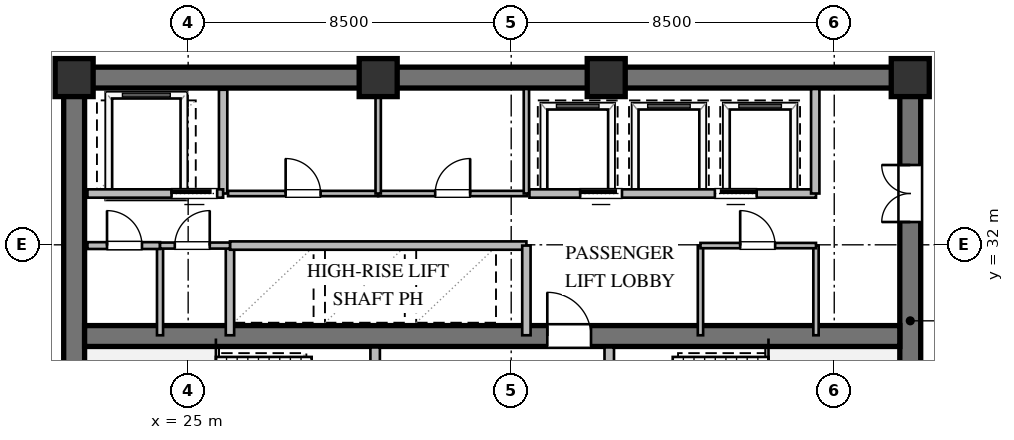
"""IFC4 building model, lengths in metres.
Left out: names, types, materials, properties, quantities, classifications, styles, units other than length and angle.
Written with IfcOpenShell. Run it as: python <this file> out.ifc"""

import sys

from ifc_helpers import new_model, si_unit, direction, frame, frame_2d, origin, origin_2d, place, context, subcontext, project, spatial, rectangle, extrude, element, fill, save


model = new_model("IFC4")
c1 = context("Model", 3, precision=1e-05, world=origin(), true_north=direction((0.0, 1.0)))
c2 = subcontext(c1, "Body", "Model", "MODEL_VIEW")
j1 = project(units=[si_unit("LENGTHUNIT", "METRE"), si_unit("PLANEANGLEUNIT", "RADIAN")], contexts=[c1])
p1 = place(None, origin())
s1 = spatial("IfcSite", under=j1, at=p1, CompositionType="ELEMENT")
p2 = place(p1, origin())
s2 = spatial("IfcBuilding", under=s1, at=p2, CompositionType="ELEMENT")
p3 = place(p2, frame((0.0, 0.0, 171.0)))
s3 = spatial("IfcBuildingStorey", under=s2, at=p3, CompositionType="ELEMENT", Elevation=171.0)
p4 = place(p3, frame((21.725, 36.4, 0.0), z_axis=(0.0, 0.0, 1.0), x_axis=(1.0, 0.0, 0.0)))
e1 = element("IfcWall", 1, at=p4, inside=s3, PredefinedType="SHEAR", context=c2, shape_type="SweptSolid", body=[
    extrude(rectangle(XDim=22.55, YDim=0.55, at=frame_2d((11.275, 0.0))), origin(), (0.0, 0.0, 1.0), 3.36),
])
p5 = place(p3, frame((22.0, 23.875, 0.0), z_axis=(0.0, 0.0, 1.0), x_axis=(0.0, 1.0, 0.0)))
e2 = element("IfcWall", 2, at=p5, inside=s3, PredefinedType="SHEAR", context=c2, shape_type="SweptSolid", body=[
    extrude(rectangle(XDim=12.25, YDim=0.55, at=frame_2d((6.125, 0.0))), origin(), (0.0, 0.0, 1.0), 3.36),
])
p6 = place(p3, frame((44.0, 23.875, 0.0), z_axis=(0.0, 0.0, 1.0), x_axis=(0.0, 1.0, 0.0)))
e3 = element("IfcWall", 3, at=p6, inside=s3, PredefinedType="SHEAR", context=c2, shape_type="SweptSolid", body=[
    extrude(rectangle(XDim=12.25, YDim=0.55, at=frame_2d((6.125, 0.0))), origin(), (0.0, 0.0, 1.0), 3.36),
])
p7 = place(p6, frame((8.725, 0.0, 0.0)))
e4 = element("IfcOpeningElement", 4, at=p7, cuts=e3, PredefinedType="OPENING", context=c2, shape_type="SweptSolid", body=[
    extrude(rectangle(XDim=1.5, YDim=2.15, at=frame_2d((0.75, 1.075))), frame((0.0, 0.285, 0.0), z_axis=(0.0, -1.0, 0.0), x_axis=(1.0, 0.0, 0.0)), (0.0, 0.0, 1.0), 0.57),
])
p8 = place(p3, frame((22.275, 29.6, 0.0), z_axis=(0.0, 0.0, 1.0), x_axis=(1.0, 0.0, 0.0)))
e5 = element("IfcWall", 5, at=p8, inside=s3, PredefinedType="SHEAR", context=c2, shape_type="SweptSolid", body=[
    extrude(rectangle(XDim=21.45, YDim=0.55, at=frame_2d((10.725, 0.0))), origin(), (0.0, 0.0, 1.0), 3.36),
])
p9 = place(p8, frame((12.175, 0.0, 0.0)))
e6 = element("IfcOpeningElement", 6, at=p9, cuts=e5, PredefinedType="OPENING", context=c2, shape_type="SweptSolid", body=[
    extrude(rectangle(XDim=1.15, YDim=2.1, at=frame_2d((0.575, 1.05))), frame((0.0, 0.285, 0.0), z_axis=(0.0, -1.0, 0.0), x_axis=(1.0, 0.0, 0.0)), (0.0, 0.0, 1.0), 0.57),
])
for number, where, z_axis, x_axis in (
    (7, (44.0, 36.4, 0.0), (0.0, 0.0, 1.0), (1.0, 0.0, 0.0)),
    (8, (36.0, 36.4, 0.0), (0.0, 0.0, 1.0), (1.0, 0.0, 0.0)),
    (9, (30.0, 36.4, 0.0), (0.0, 0.0, 1.0), (1.0, 0.0, 0.0)),
    (10, (22.0, 36.4, 0.0), (0.0, 0.0, 1.0), (1.0, 0.0, 0.0)),
):
    element("IfcColumn", number, at=place(p3, frame(where, z_axis=z_axis, x_axis=x_axis)), inside=s3, PredefinedType="COLUMN", context=c2, shape_type="SweptSolid", body=[
        extrude(rectangle(XDim=1.0, YDim=1.0, at=origin_2d()), origin(), (0.0, 0.0, 1.0), 3.6),
    ])
p10 = place(p3, frame((29.92, 23.9, 0.0), z_axis=(0.0, 0.0, 1.0), x_axis=(0.0, 1.0, 0.0)))
e11 = element("IfcWall", 11, at=p10, inside=s3, PredefinedType="SOLIDWALL", context=c2, shape_type="SweptSolid", body=[
    extrude(rectangle(XDim=5.4, YDim=0.25, at=frame_2d((2.7, 0.0))), origin(), (0.0, 0.0, 1.0), 2.89),
])
p11 = place(p10, frame((3.421, 0.0, 0.0)))
e12 = element("IfcOpeningElement", 12, at=p11, cuts=e11, PredefinedType="OPENING", context=c2, shape_type="SweptSolid", body=[
    extrude(rectangle(XDim=1.15, YDim=2.1, at=frame_2d((0.575, 1.05))), frame((0.0, 0.135, 0.0), z_axis=(0.0, -1.0, 0.0), x_axis=(1.0, 0.0, 0.0)), (0.0, 0.0, 1.0), 0.27),
])
p12 = place(p3, frame((36.08, 23.9, 0.0), z_axis=(0.0, 0.0, 1.0), x_axis=(0.0, 1.0, 0.0)))
e13 = element("IfcWall", 13, at=p12, inside=s3, PredefinedType="SOLIDWALL", context=c2, shape_type="SweptSolid", body=[
    extrude(rectangle(XDim=5.4, YDim=0.25, at=frame_2d((2.7, 0.0))), origin(), (0.0, 0.0, 1.0), 3.36),
])
p13 = place(p12, frame((3.421, 0.0, 0.0)))
e14 = element("IfcOpeningElement", 14, at=p13, cuts=e13, PredefinedType="OPENING", context=c2, shape_type="SweptSolid", body=[
    extrude(rectangle(XDim=1.15, YDim=2.1, at=frame_2d((0.575, 1.05))), frame((0.0, 0.135, 0.0), z_axis=(0.0, -1.0, 0.0), x_axis=(1.0, 0.0, 0.0)), (0.0, 0.0, 1.0), 0.27),
])
p14 = place(p3, frame((25.92, 33.35, 0.0), z_axis=(0.0, 0.0, 1.0), x_axis=(0.0, 1.0, 0.0)))
e15 = element("IfcWall", 15, at=p14, inside=s3, PredefinedType="SOLIDWALL", context=c2, shape_type="SweptSolid", body=[
    extrude(rectangle(XDim=2.73, YDim=0.22, at=frame_2d((1.365, 0.0))), origin(), (0.0, 0.0, 1.0), 3.36),
])
p15 = place(p3, frame((22.35, 33.35, 0.0), z_axis=(0.0, 0.0, 1.0), x_axis=(1.0, 0.0, 0.0)))
e16 = element("IfcWall", 16, at=p15, inside=s3, PredefinedType="SOLIDWALL", context=c2, shape_type="SweptSolid", body=[
    extrude(rectangle(XDim=3.57, YDim=0.22, at=frame_2d((1.785, 0.0))), origin(), (0.0, 0.0, 1.0), 3.36),
])
p16 = place(p15, frame((2.213, 0.0, 0.0)))
e17 = element("IfcOpeningElement", 17, at=p16, cuts=e16, PredefinedType="OPENING", context=c2, shape_type="SweptSolid", body=[
    extrude(rectangle(XDim=1.2, YDim=2.1, at=frame_2d((0.6, 1.05))), frame((0.0, 0.12, 0.0), z_axis=(0.0, -1.0, 0.0), x_axis=(1.0, 0.0, 0.0)), (0.0, 0.0, 1.0), 0.24),
])
p17 = place(p3, frame((26.1, 29.62, 0.0), z_axis=(0.0, 0.0, 1.0), x_axis=(0.0, 1.0, 0.0)))
e18 = element("IfcWall", 18, at=p17, inside=s3, PredefinedType="SOLIDWALL", context=c2, shape_type="SweptSolid", body=[
    extrude(rectangle(XDim=2.36, YDim=0.22, at=frame_2d((1.18, 0.0))), origin(), (0.0, 0.0, 1.0), 3.36),
])
p18 = place(p3, frame((26.1, 31.98, 0.0), z_axis=(0.0, 0.0, 1.0), x_axis=(1.0, 0.0, 0.0)))
e19 = element("IfcWall", 19, at=p18, inside=s3, PredefinedType="SOLIDWALL", context=c2, shape_type="SweptSolid", body=[
    extrude(rectangle(XDim=7.8, YDim=0.22, at=frame_2d((3.9, 0.0))), origin(), (0.0, 0.0, 1.0), 3.36),
])
p19 = place(p3, frame((33.9, 29.62, 0.0), z_axis=(0.0, 0.0, 1.0), x_axis=(0.0, 1.0, 0.0)))
e20 = element("IfcWall", 20, at=p19, inside=s3, PredefinedType="SOLIDWALL", context=c2, shape_type="SweptSolid", body=[
    extrude(rectangle(XDim=2.36, YDim=0.22, at=frame_2d((1.18, 0.0))), origin(), (0.0, 0.0, 1.0), 3.36),
])
p20 = place(p3, frame((26.05, 33.35, 0.0), z_axis=(0.0, 0.0, 1.0), x_axis=(1.0, 0.0, 0.0)))
e21 = element("IfcWall", 21, at=p20, inside=s3, PredefinedType="PARTITIONING", context=c2, shape_type="SweptSolid", body=[
    extrude(rectangle(XDim=3.95, YDim=0.14, at=frame_2d((1.975, 0.0))), origin(), (0.0, 0.0, 1.0), 3.36),
])
p21 = place(p20, frame((1.515, 0.0, 0.0)))
e22 = element("IfcOpeningElement", 22, at=p21, cuts=e21, PredefinedType="OPENING", context=c2, shape_type="SweptSolid", body=[
    extrude(rectangle(XDim=0.92, YDim=2.1, at=frame_2d((0.46, 1.05))), frame((0.0, 0.08, 0.0), z_axis=(0.0, -1.0, 0.0), x_axis=(1.0, 0.0, 0.0)), (0.0, 0.0, 1.0), 0.16),
])
p22 = place(p3, frame((30.0, 33.35, 0.0), z_axis=(0.0, 0.0, 1.0), x_axis=(1.0, 0.0, 0.0)))
e23 = element("IfcWall", 23, at=p22, inside=s3, PredefinedType="PARTITIONING", context=c2, shape_type="SweptSolid", body=[
    extrude(rectangle(XDim=3.92, YDim=0.14, at=frame_2d((1.96, 0.0))), origin(), (0.0, 0.0, 1.0), 3.36),
])
p23 = place(p22, frame((1.5, 0.0, 0.0)))
e24 = element("IfcOpeningElement", 24, at=p23, cuts=e23, PredefinedType="OPENING", context=c2, shape_type="SweptSolid", body=[
    extrude(rectangle(XDim=0.92, YDim=2.1, at=frame_2d((0.46, 1.05))), frame((0.0, 0.08, 0.0), z_axis=(0.0, -1.0, 0.0), x_axis=(1.0, 0.0, 0.0)), (0.0, 0.0, 1.0), 0.16),
])
for number, where, z_axis, x_axis in (
    (25, (30.0, 33.35, 0.0), (0.0, 0.0, 1.0), (0.0, 1.0, 0.0)),
    (26, (33.9, 33.35, 0.0), (0.0, 0.0, 1.0), (0.0, 1.0, 0.0)),
):
    element("IfcWall", number, at=place(p3, frame(where, z_axis=z_axis, x_axis=x_axis)), inside=s3, PredefinedType="PARTITIONING", context=c2, shape_type="SweptSolid", body=[
        extrude(rectangle(XDim=2.75, YDim=0.14, at=frame_2d((1.375, 0.0))), origin(), (0.0, 0.0, 1.0), 3.36),
    ])
p24 = place(p3, frame((33.98, 33.35, 0.0), z_axis=(0.0, 0.0, 1.0), x_axis=(1.0, 0.0, 0.0)))
e27 = element("IfcWall", 27, at=p24, inside=s3, PredefinedType="SOLIDWALL", context=c2, shape_type="SweptSolid", body=[
    extrude(rectangle(XDim=7.54, YDim=0.22, at=frame_2d((3.77, 0.0))), origin(), (0.0, 0.0, 1.0), 3.36),
])
p25 = place(p24, frame((1.335, 0.0, 0.0)))
e28 = element("IfcOpeningElement", 28, at=p25, cuts=e27, PredefinedType="OPENING", context=c2, shape_type="SweptSolid", body=[
    extrude(rectangle(XDim=1.1, YDim=2.1, at=frame_2d((0.55, 1.05))), frame((0.0, 0.12, 0.0), z_axis=(0.0, -1.0, 0.0), x_axis=(1.0, 0.0, 0.0)), (0.0, 0.0, 1.0), 0.24),
])
p26 = place(p24, frame((4.879, 0.0, 0.0)))
e29 = element("IfcOpeningElement", 29, at=p26, cuts=e27, PredefinedType="OPENING", context=c2, shape_type="SweptSolid", body=[
    extrude(rectangle(XDim=1.1, YDim=2.1, at=frame_2d((0.55, 1.05))), frame((0.0, 0.12, 0.0), z_axis=(0.0, -1.0, 0.0), x_axis=(1.0, 0.0, 0.0)), (0.0, 0.0, 1.0), 0.24),
])
p27 = place(p3, frame((41.5, 33.35, 0.0), z_axis=(0.0, 0.0, 1.0), x_axis=(0.0, 1.0, 0.0)))
e30 = element("IfcWall", 30, at=p27, inside=s3, PredefinedType="SOLIDWALL", context=c2, shape_type="SweptSolid", body=[
    extrude(rectangle(XDim=2.75, YDim=0.22, at=frame_2d((1.375, 0.0))), origin(), (0.0, 0.0, 1.0), 3.36),
])
p28 = place(p3, frame((24.26, 29.62, 0.0), z_axis=(0.0, 0.0, 1.0), x_axis=(0.0, 1.0, 0.0)))
e31 = element("IfcWall", 31, at=p28, inside=s3, PredefinedType="PLUMBINGWALL", context=c2, shape_type="SweptSolid", body=[
    extrude(rectangle(XDim=2.36, YDim=0.16, at=frame_2d((1.18, 0.0))), origin(), (0.0, 0.0, 1.0), 3.36),
])
p29 = place(p3, frame((22.35, 31.98, 0.0), z_axis=(0.0, 0.0, 1.0), x_axis=(1.0, 0.0, 0.0)))
e32 = element("IfcWall", 32, at=p29, inside=s3, PredefinedType="PARTITIONING", context=c2, shape_type="SweptSolid", body=[
    extrude(rectangle(XDim=1.91, YDim=0.18, at=frame_2d((0.955, 0.0))), origin(), (0.0, 0.0, 1.0), 3.36),
])
p30 = place(p29, frame((0.515, 0.0, 0.0)))
e33 = element("IfcOpeningElement", 33, at=p30, cuts=e32, PredefinedType="OPENING", context=c2, shape_type="SweptSolid", body=[
    extrude(rectangle(XDim=0.92, YDim=2.1, at=frame_2d((0.46, 1.05))), frame((0.0, 0.1, 0.0), z_axis=(0.0, -1.0, 0.0), x_axis=(1.0, 0.0, 0.0)), (0.0, 0.0, 1.0), 0.2),
])
p31 = place(p3, frame((24.26, 31.98, 0.0), z_axis=(0.0, 0.0, 1.0), x_axis=(1.0, 0.0, 0.0)))
e34 = element("IfcWall", 34, at=p31, inside=s3, PredefinedType="PLUMBINGWALL", context=c2, shape_type="SweptSolid", body=[
    extrude(rectangle(XDim=1.84, YDim=0.16, at=frame_2d((0.92, 0.0))), origin(), (0.0, 0.0, 1.0), 3.36),
])
p32 = place(p31, frame((0.388, 0.0, 0.0)))
e35 = element("IfcOpeningElement", 35, at=p32, cuts=e34, PredefinedType="OPENING", context=c2, shape_type="SweptSolid", body=[
    extrude(rectangle(XDim=0.92, YDim=2.1, at=frame_2d((0.46, 1.05))), frame((0.0, 0.09, 0.0), z_axis=(0.0, -1.0, 0.0), x_axis=(1.0, 0.0, 0.0)), (0.0, 0.0, 1.0), 0.18),
])
for number, where, z_axis, x_axis in (
    (36, (38.48, 29.62, 0.0), (0.0, 0.0, 1.0), (0.0, 1.0, 0.0)),
    (37, (41.52, 29.62, 0.0), (0.0, 0.0, 1.0), (0.0, 1.0, 0.0)),
):
    element("IfcWall", number, at=place(p3, frame(where, z_axis=z_axis, x_axis=x_axis)), inside=s3, PredefinedType="PARTITIONING", context=c2, shape_type="SweptSolid", body=[
        extrude(rectangle(XDim=2.36, YDim=0.14, at=frame_2d((1.18, 0.0))), origin(), (0.0, 0.0, 1.0), 3.36),
    ])
p33 = place(p3, frame((38.48, 31.98, 0.0), z_axis=(0.0, 0.0, 1.0), x_axis=(1.0, 0.0, 0.0)))
e38 = element("IfcWall", 38, at=p33, inside=s3, PredefinedType="PARTITIONING", context=c2, shape_type="SweptSolid", body=[
    extrude(rectangle(XDim=3.04, YDim=0.14, at=frame_2d((1.52, 0.0))), origin(), (0.0, 0.0, 1.0), 3.36),
])
p34 = place(p33, frame((1.045, 0.0, 0.0)))
e39 = element("IfcOpeningElement", 39, at=p34, cuts=e38, PredefinedType="OPENING", context=c2, shape_type="SweptSolid", body=[
    extrude(rectangle(XDim=0.92, YDim=2.1, at=frame_2d((0.46, 1.05))), frame((0.0, 0.08, 0.0), z_axis=(0.0, -1.0, 0.0), x_axis=(1.0, 0.0, 0.0)), (0.0, 0.0, 1.0), 0.16),
])
p35 = place(p9, origin())
e40 = element("IfcDoor", 40, at=p35, inside=s3, OperationType="SINGLE_SWING_LEFT", PredefinedType="DOOR", context=c2, shape_type="SweptSolid", body=[
    extrude(rectangle(XDim=1.15, YDim=2.1, at=frame_2d((0.575, 1.05))), frame((0.0, 0.025, 0.0), z_axis=(0.0, -1.0, 0.0), x_axis=(1.0, 0.0, 0.0)), (0.0, 0.0, 1.0), 0.05),
])
fill(e6, e40)
p36 = place(p7, origin())
e41 = element("IfcDoor", 41, at=p36, inside=s3, OperationType="DOUBLE_DOOR_SINGLE_SWING", PredefinedType="DOOR", context=c2, shape_type="SweptSolid", body=[
    extrude(rectangle(XDim=1.5, YDim=2.15, at=frame_2d((0.75, 1.075))), frame((0.0, 0.025, 0.0), z_axis=(0.0, -1.0, 0.0), x_axis=(1.0, 0.0, 0.0)), (0.0, 0.0, 1.0), 0.05),
])
fill(e4, e41)
p37 = place(p16, origin())
e42 = element("IfcDoor", 42, at=p37, inside=s3, OperationType="SLIDING_TO_LEFT", PredefinedType="DOOR", context=c2, shape_type="SweptSolid", body=[
    extrude(rectangle(XDim=1.2, YDim=2.1, at=frame_2d((0.6, 1.05))), frame((0.0, 0.025, 0.0), z_axis=(0.0, -1.0, 0.0), x_axis=(1.0, 0.0, 0.0)), (0.0, 0.0, 1.0), 0.05),
])
fill(e17, e42)
p38 = place(p21, origin())
e43 = element("IfcDoor", 43, at=p38, inside=s3, OperationType="SINGLE_SWING_LEFT", PredefinedType="DOOR", context=c2, shape_type="SweptSolid", body=[
    extrude(rectangle(XDim=0.92, YDim=2.1, at=frame_2d((0.46, 1.05))), frame((0.0, 0.025, 0.0), z_axis=(0.0, -1.0, 0.0), x_axis=(1.0, 0.0, 0.0)), (0.0, 0.0, 1.0), 0.05),
])
fill(e22, e43)
p39 = place(p23, origin())
e44 = element("IfcDoor", 44, at=p39, inside=s3, OperationType="SINGLE_SWING_RIGHT", PredefinedType="DOOR", context=c2, shape_type="SweptSolid", body=[
    extrude(rectangle(XDim=0.92, YDim=2.1, at=frame_2d((0.46, 1.05))), frame((0.0, 0.025, 0.0), z_axis=(0.0, -1.0, 0.0), x_axis=(1.0, 0.0, 0.0)), (0.0, 0.0, 1.0), 0.05),
])
fill(e24, e44)
p40 = place(p25, origin())
e45 = element("IfcDoor", 45, at=p40, inside=s3, OperationType="SLIDING_TO_LEFT", PredefinedType="DOOR", context=c2, shape_type="SweptSolid", body=[
    extrude(rectangle(XDim=1.1, YDim=2.1, at=frame_2d((0.55, 1.05))), frame((0.0, 0.025, 0.0), z_axis=(0.0, -1.0, 0.0), x_axis=(1.0, 0.0, 0.0)), (0.0, 0.0, 1.0), 0.05),
])
fill(e28, e45)
p41 = place(p26, origin())
e46 = element("IfcDoor", 46, at=p41, inside=s3, OperationType="SLIDING_TO_RIGHT", PredefinedType="DOOR", context=c2, shape_type="SweptSolid", body=[
    extrude(rectangle(XDim=1.1, YDim=2.1, at=frame_2d((0.55, 1.05))), frame((0.0, 0.025, 0.0), z_axis=(0.0, -1.0, 0.0), x_axis=(1.0, 0.0, 0.0)), (0.0, 0.0, 1.0), 0.05),
])
fill(e29, e46)
p42 = place(p30, origin())
e47 = element("IfcDoor", 47, at=p42, inside=s3, OperationType="SINGLE_SWING_LEFT", PredefinedType="DOOR", context=c2, shape_type="SweptSolid", body=[
    extrude(rectangle(XDim=0.92, YDim=2.1, at=frame_2d((0.46, 1.05))), frame((0.0, 0.025, 0.0), z_axis=(0.0, -1.0, 0.0), x_axis=(1.0, 0.0, 0.0)), (0.0, 0.0, 1.0), 0.05),
])
fill(e33, e47)
p43 = place(p32, origin())
e48 = element("IfcDoor", 48, at=p43, inside=s3, OperationType="SINGLE_SWING_RIGHT", PredefinedType="DOOR", context=c2, shape_type="SweptSolid", body=[
    extrude(rectangle(XDim=0.92, YDim=2.1, at=frame_2d((0.46, 1.05))), frame((0.0, 0.025, 0.0), z_axis=(0.0, -1.0, 0.0), x_axis=(1.0, 0.0, 0.0)), (0.0, 0.0, 1.0), 0.05),
])
fill(e35, e48)
p44 = place(p34, origin())
e49 = element("IfcDoor", 49, at=p44, inside=s3, OperationType="SINGLE_SWING_LEFT", PredefinedType="DOOR", context=c2, shape_type="SweptSolid", body=[
    extrude(rectangle(XDim=0.92, YDim=2.1, at=frame_2d((0.46, 1.05))), frame((0.0, 0.025, 0.0), z_axis=(0.0, -1.0, 0.0), x_axis=(1.0, 0.0, 0.0)), (0.0, 0.0, 1.0), 0.05),
])
fill(e39, e49)
save(model, sys.argv[1])
